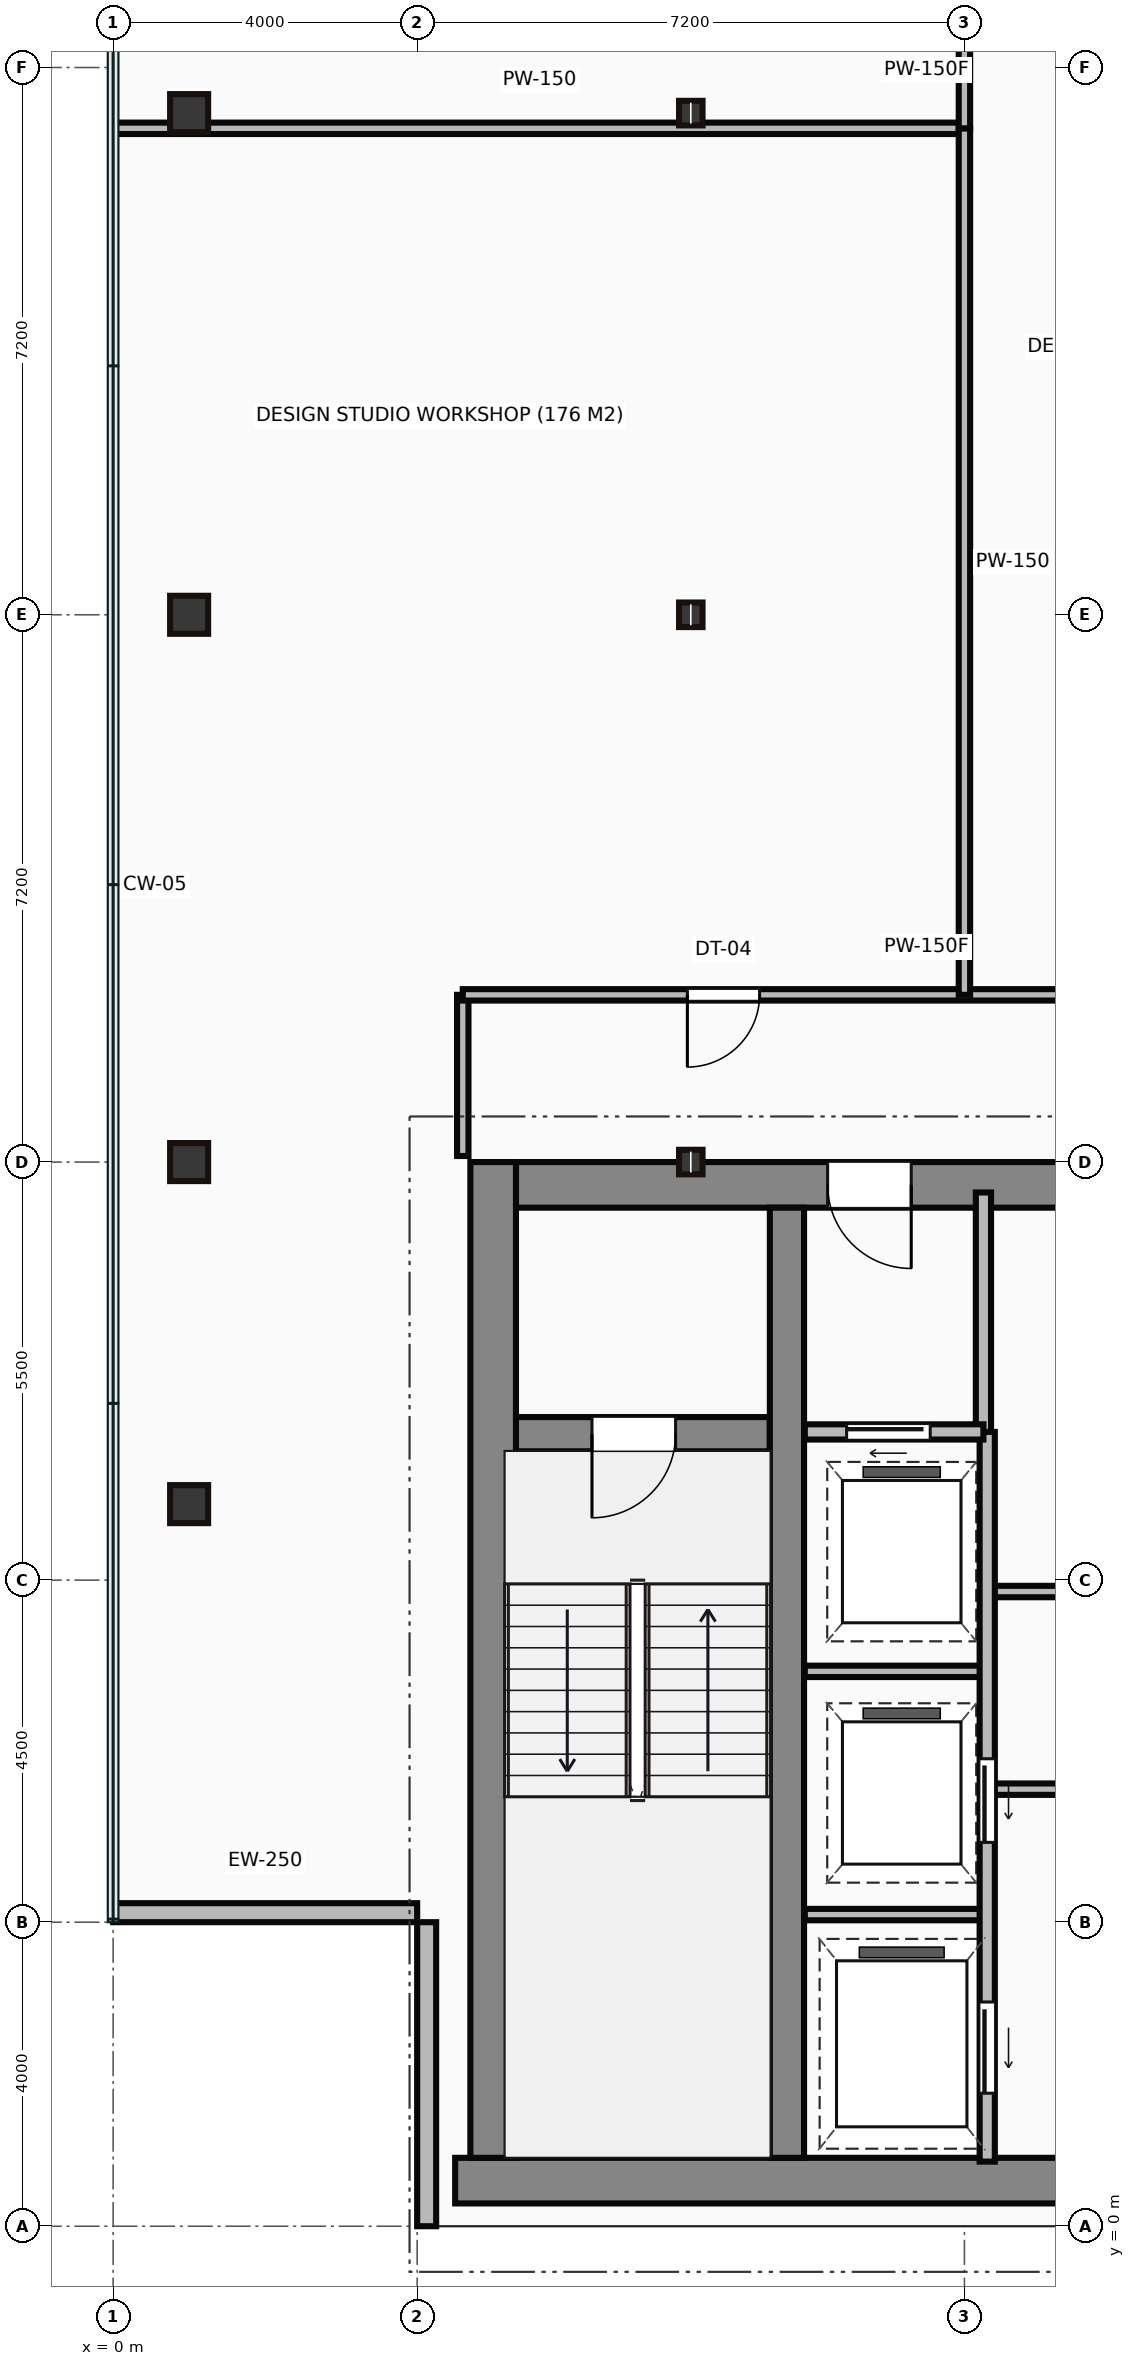
"""IFC4 building model, lengths in metres.
Left out: names, types, materials, properties, quantities, classifications, styles, units other than length and angle.
Written with IfcOpenShell. Run it as: python <this file> out.ifc"""

import sys

from ifc_helpers import new_model, si_unit, direction, frame, frame_2d, origin, origin_2d, place, context, subcontext, project, spatial, rectangle, hollow_rectangle, i_section, extrude, source, transform, mapped, element, fill, save


model = new_model("IFC4")
c1 = context("Model", 3, precision=1e-05, world=origin(), true_north=direction((0.0, 1.0)))
c2 = subcontext(c1, "Body", "Model", "MODEL_VIEW")
j1 = project(units=[si_unit("LENGTHUNIT", "METRE"), si_unit("PLANEANGLEUNIT", "RADIAN")], contexts=[c1])
p1 = place(None, origin())
s1 = spatial("IfcSite", under=j1, at=p1, CompositionType="ELEMENT")
p2 = place(p1, origin())
s2 = spatial("IfcBuilding", under=s1, at=p2, CompositionType="ELEMENT")
p3 = place(p2, frame((0.0, 0.0, 192.25)))
s3 = spatial("IfcBuildingStorey", under=s2, at=p3, CompositionType="ELEMENT", Elevation=192.25)
m1 = source(origin(), c2, "Body", "SweptSolid", [
    extrude(rectangle(XDim=29.5, YDim=0.6, at=frame_2d((14.75, 0.0))), origin(), (0.0, 0.0, 1.0), 3.65),
])
p4 = place(p3, frame((4.5, 0.6, 0.0), z_axis=(0.0, 0.0, 1.0), x_axis=(1.0, 0.0, 0.0)))
e1 = element("IfcWall", 1, at=p4, inside=s3, PredefinedType="SHEAR", context=c2, shape_type="MappedRepresentation", body=[
    mapped(m1, transform((0.0, 0.0, 0.0))),
])
m2 = source(origin(), c2, "Body", "SweptSolid", [
    extrude(rectangle(XDim=13.1, YDim=0.6, at=frame_2d((6.55, 0.0))), origin(), (0.0, 0.0, 1.0), 3.65),
])
p5 = place(p3, frame((5.0, 0.9, 0.0), z_axis=(0.0, 0.0, 1.0), x_axis=(0.0, 1.0, 0.0)))
e2 = element("IfcWall", 2, at=p5, inside=s3, PredefinedType="SHEAR", context=c2, shape_type="MappedRepresentation", body=[
    mapped(m2, transform((0.0, 0.0, 0.0))),
])
m3 = source(origin(), c2, "Body", "SweptSolid", [
    extrude(rectangle(XDim=9.1, YDim=0.6, at=frame_2d((4.55, 0.0))), origin(), (0.0, 0.0, 1.0), 3.65),
])
p6 = place(p3, frame((5.3, 13.7, 0.0), z_axis=(0.0, 0.0, 1.0), x_axis=(1.0, 0.0, 0.0)))
e3 = element("IfcWall", 3, at=p6, inside=s3, PredefinedType="SHEAR", context=c2, shape_type="MappedRepresentation", body=[
    mapped(m3, transform((0.0, 0.0, 0.0))),
])
p7 = place(p6, frame((4.1, 0.0, 0.0)))
e4 = element("IfcOpeningElement", 4, at=p7, cuts=e3, PredefinedType="OPENING", context=c2, shape_type="SweptSolid", body=[
    extrude(rectangle(XDim=1.1, YDim=2.15, at=frame_2d((0.55, 1.075))), frame((0.0, 0.31, 0.0), z_axis=(0.0, -1.0, 0.0), x_axis=(1.0, 0.0, 0.0)), (0.0, 0.0, 1.0), 0.62),
])
m4 = source(origin(), c2, "Body", "SweptSolid", [
    extrude(rectangle(XDim=12.5, YDim=0.45, at=frame_2d((6.25, 0.0))), origin(), (0.0, 0.0, 1.0), 3.65),
])
p8 = place(p3, frame((8.865, 0.9, 0.0), z_axis=(0.0, 0.0, 1.0), x_axis=(0.0, 1.0, 0.0)))
e5 = element("IfcWall", 5, at=p8, inside=s3, PredefinedType="SHEAR", context=c2, shape_type="MappedRepresentation", body=[
    mapped(m4, transform((0.0, 0.0, 0.0))),
])
m5 = source(origin(), c2, "Body", "SweptSolid", [
    extrude(rectangle(XDim=3.39, YDim=0.45, at=frame_2d((1.695, 0.0))), origin(), (0.0, 0.0, 1.0), 3.65),
])
p9 = place(p3, frame((5.25, 10.42, 0.0), z_axis=(0.0, 0.0, 1.0), x_axis=(1.0, 0.0, 0.0)))
e6 = element("IfcWall", 6, at=p9, inside=s3, PredefinedType="SHEAR", context=c2, shape_type="MappedRepresentation", body=[
    mapped(m5, transform((0.0, 0.0, 0.0))),
])
p10 = place(p9, frame((1.05, 0.0, 0.0)))
e7 = element("IfcOpeningElement", 7, at=p10, cuts=e6, PredefinedType="OPENING", context=c2, shape_type="SweptSolid", body=[
    extrude(rectangle(XDim=1.1, YDim=2.15, at=frame_2d((0.55, 1.075))), frame((0.0, 0.235, 0.0), z_axis=(0.0, -1.0, 0.0), x_axis=(1.0, 0.0, 0.0)), (0.0, 0.0, 1.0), 0.47),
])
m6 = source(origin(), c2, "Body", "SweptSolid", [
    extrude(hollow_rectangle(XDim=0.5, YDim=0.5, WallThickness=0.022, at=origin_2d()), origin(), (0.0, 0.0, 1.0), 3.65),
])
for number, where, z_axis, x_axis in (
    (8, (1.0, 9.5, 0.0), (0.0, 0.0, 1.0), (1.0, 0.0, 0.0)),
    (9, (1.0, 14.0, 0.0), (0.0, 0.0, 1.0), (1.0, 0.0, 0.0)),
    (10, (1.0, 21.2, 0.0), (0.0, 0.0, 1.0), (1.0, 0.0, 0.0)),
    (11, (1.0, 27.8, 0.0), (0.0, 0.0, 1.0), (1.0, 0.0, 0.0)),
):
    element("IfcColumn", number, at=place(p3, frame(where, z_axis=z_axis, x_axis=x_axis)), inside=s3, PredefinedType="COLUMN", context=c2, shape_type="MappedRepresentation", body=[
        mapped(m6, transform((0.0, 0.0, 0.0))),
    ])
m7 = source(origin(), c2, "Body", "SweptSolid", [
    extrude(i_section(OverallWidth=0.309, OverallDepth=0.323, WebThickness=0.014, FlangeThickness=0.023, at=origin_2d()), origin(), (0.0, 0.0, 1.0), 3.65),
])
for number, where, z_axis, x_axis in (
    (12, (7.6, 14.0, 0.0), (0.0, 0.0, 1.0), (1.0, 0.0, 0.0)),
    (13, (7.6, 21.2, 0.0), (0.0, 0.0, 1.0), (1.0, 0.0, 0.0)),
    (14, (7.6, 27.8, 0.0), (0.0, 0.0, 1.0), (1.0, 0.0, 0.0)),
):
    element("IfcColumn", number, at=place(p3, frame(where, z_axis=z_axis, x_axis=x_axis)), inside=s3, PredefinedType="COLUMN", context=c2, shape_type="MappedRepresentation", body=[
        mapped(m7, transform((0.0, 0.0, 0.0))),
    ])
m8 = source(origin(), c2, "Body", "SweptSolid", [
    extrude(rectangle(XDim=4.0, YDim=0.25, at=frame_2d((2.0, 0.0))), origin(), (0.0, 0.0, 1.0), 3.4),
])
for number, where, z_axis, x_axis in (
    (15, (0.0, 4.125, 0.0), (0.0, 0.0, 1.0), (1.0, 0.0, 0.0)),
    (16, (4.125, 4.0, 0.0), (0.0, 0.0, 1.0), (0.0, -1.0, 0.0)),
):
    element("IfcWall", number, at=place(p3, frame(where, z_axis=z_axis, x_axis=x_axis)), inside=s3, PredefinedType="STANDARD", context=c2, shape_type="MappedRepresentation", body=[
        mapped(m8, transform((0.0, 0.0, 0.0))),
    ])
m9 = source(origin(), c2, "Body", "SweptSolid", [
    extrude(rectangle(XDim=3.18, YDim=0.2, at=frame_2d((1.59, 0.0))), origin(), (0.0, 0.0, 1.0), 3.4),
])
p11 = place(p3, frame((11.45, 10.42, 0.0), z_axis=(0.0, 0.0, 1.0), x_axis=(0.0, 1.0, 0.0)))
e17 = element("IfcWall", 17, at=p11, inside=s3, PredefinedType="PARTITIONING", context=c2, shape_type="MappedRepresentation", body=[
    mapped(m9, transform((0.0, 0.0, 0.0))),
])
m10 = source(origin(), c2, "Body", "SweptSolid", [
    extrude(rectangle(XDim=2.35, YDim=0.2, at=frame_2d((1.175, 0.0))), origin(), (0.0, 0.0, 1.0), 3.4),
])
p12 = place(p3, frame((9.1, 10.45, 0.0), z_axis=(0.0, 0.0, 1.0), x_axis=(1.0, 0.0, 0.0)))
e18 = element("IfcWall", 18, at=p12, inside=s3, PredefinedType="PARTITIONING", context=c2, shape_type="MappedRepresentation", body=[
    mapped(m10, transform((0.0, 0.0, 0.0))),
])
p13 = place(p12, frame((0.55, 0.0, 0.0)))
e19 = element("IfcOpeningElement", 19, at=p13, cuts=e18, PredefinedType="OPENING", context=c2, shape_type="SweptSolid", body=[
    extrude(rectangle(XDim=1.1, YDim=2.15, at=frame_2d((0.55, 1.075))), frame((0.0, 0.11, 0.0), z_axis=(0.0, -1.0, 0.0), x_axis=(1.0, 0.0, 0.0)), (0.0, 0.0, 1.0), 0.22),
])
m11 = source(origin(), c2, "Body", "SweptSolid", [
    extrude(rectangle(XDim=9.6, YDim=0.2, at=frame_2d((4.8, 0.0))), origin(), (0.0, 0.0, 1.0), 3.4),
])
p14 = place(p3, frame((11.5, 0.85, 0.0), z_axis=(0.0, 0.0, 1.0), x_axis=(0.0, 1.0, 0.0)))
e20 = element("IfcWall", 20, at=p14, inside=s3, PredefinedType="PARTITIONING", context=c2, shape_type="MappedRepresentation", body=[
    mapped(m11, transform((0.0, 0.0, 0.0))),
])
p15 = place(p14, frame((4.2, 0.0, 0.0)))
e21 = element("IfcOpeningElement", 21, at=p15, cuts=e20, PredefinedType="OPENING", context=c2, shape_type="SweptSolid", body=[
    extrude(rectangle(XDim=1.1, YDim=2.15, at=frame_2d((0.55, 1.075))), frame((0.0, 0.11, 0.0), z_axis=(0.0, -1.0, 0.0), x_axis=(1.0, 0.0, 0.0)), (0.0, 0.0, 1.0), 0.22),
])
p16 = place(p14, frame((0.9, 0.0, 0.0)))
e22 = element("IfcOpeningElement", 22, at=p16, cuts=e20, PredefinedType="OPENING", context=c2, shape_type="SweptSolid", body=[
    extrude(rectangle(XDim=1.2, YDim=2.15, at=frame_2d((0.6, 1.075))), frame((0.0, 0.11, 0.0), z_axis=(0.0, -1.0, 0.0), x_axis=(1.0, 0.0, 0.0)), (0.0, 0.0, 1.0), 0.22),
])
m12 = source(origin(), c2, "Body", "SweptSolid", [
    extrude(rectangle(XDim=2.4, YDim=0.15, at=frame_2d((1.2, 0.0))), origin(), (0.0, 0.0, 1.0), 3.4),
])
for number, where, z_axis, x_axis in (
    (23, (9.1, 4.1, 0.0), (0.0, 0.0, 1.0), (1.0, 0.0, 0.0)),
    (24, (9.1, 7.3, 0.0), (0.0, 0.0, 1.0), (1.0, 0.0, 0.0)),
):
    element("IfcWall", number, at=place(p3, frame(where, z_axis=z_axis, x_axis=x_axis)), inside=s3, PredefinedType="PARTITIONING", context=c2, shape_type="MappedRepresentation", body=[
        mapped(m12, transform((0.0, 0.0, 0.0))),
    ])
m13 = source(origin(), c2, "Body", "SweptSolid", [
    extrude(rectangle(XDim=11.85, YDim=0.15, at=frame_2d((5.925, 0.0))), origin(), (0.0, 0.0, 1.0), 3.4),
])
p17 = place(p3, frame((11.55, 5.75, 0.0), z_axis=(0.0, 0.0, 1.0), x_axis=(1.0, 0.0, 0.0)))
e25 = element("IfcWall", 25, at=p17, inside=s3, PredefinedType="PARTITIONING", context=c2, shape_type="MappedRepresentation", body=[
    mapped(m13, transform((0.0, 0.0, 0.0))),
])
p18 = place(p3, frame((11.55, 8.35, 0.0), z_axis=(0.0, 0.0, 1.0), x_axis=(1.0, 0.0, 0.0)))
e26 = element("IfcWall", 26, at=p18, inside=s3, PredefinedType="PARTITIONING", context=c2, shape_type="MappedRepresentation", body=[
    mapped(m13, transform((0.0, 0.0, 0.0))),
])
p19 = place(p18, frame((1.1, 0.0, 0.0)))
e27 = element("IfcOpeningElement", 27, at=p19, cuts=e26, PredefinedType="OPENING", context=c2, shape_type="SweptSolid", body=[
    extrude(rectangle(XDim=0.95, YDim=2.15, at=frame_2d((0.475, 1.075))), frame((0.0, 0.085, 0.0), z_axis=(0.0, -1.0, 0.0), x_axis=(1.0, 0.0, 0.0)), (0.0, 0.0, 1.0), 0.17),
])
p20 = place(p18, frame((9.4, 0.0, 0.0)))
e28 = element("IfcOpeningElement", 28, at=p20, cuts=e26, PredefinedType="OPENING", context=c2, shape_type="SweptSolid", body=[
    extrude(rectangle(XDim=0.95, YDim=2.15, at=frame_2d((0.475, 1.075))), frame((0.0, 0.085, 0.0), z_axis=(0.0, -1.0, 0.0), x_axis=(1.0, 0.0, 0.0)), (0.0, 0.0, 1.0), 0.17),
])
m14 = source(origin(), c2, "Body", "SweptSolid", [
    extrude(rectangle(XDim=2.12, YDim=0.15, at=frame_2d((1.06, 0.0))), origin(), (0.0, 0.0, 1.0), 3.4),
])
p21 = place(p3, frame((4.6, 14.08, 0.0), z_axis=(0.0, 0.0, 1.0), x_axis=(0.0, 1.0, 0.0)))
e29 = element("IfcWall", 29, at=p21, inside=s3, PredefinedType="PARTITIONING", context=c2, shape_type="MappedRepresentation", body=[
    mapped(m14, transform((0.0, 0.0, 0.0))),
])
m15 = source(origin(), c2, "Body", "SweptSolid", [
    extrude(rectangle(XDim=12.2, YDim=0.15, at=frame_2d((6.1, 0.0))), origin(), (0.0, 0.0, 1.0), 3.4),
])
p22 = place(p3, frame((4.6, 16.2, 0.0), z_axis=(0.0, 0.0, 1.0), x_axis=(1.0, 0.0, 0.0)))
e30 = element("IfcWall", 30, at=p22, inside=s3, PredefinedType="PARTITIONING", context=c2, shape_type="MappedRepresentation", body=[
    mapped(m15, transform((0.0, 0.0, 0.0))),
])
p23 = place(p22, frame((2.955, 0.0, 0.0)))
e31 = element("IfcOpeningElement", 31, at=p23, cuts=e30, PredefinedType="OPENING", context=c2, shape_type="SweptSolid", body=[
    extrude(rectangle(XDim=0.95, YDim=2.15, at=frame_2d((0.475, 1.075))), frame((0.0, 0.085, 0.0), z_axis=(0.0, -1.0, 0.0), x_axis=(1.0, 0.0, 0.0)), (0.0, 0.0, 1.0), 0.17),
])
m16 = source(origin(), c2, "Body", "SweptSolid", [
    extrude(rectangle(XDim=11.18, YDim=0.15, at=frame_2d((5.59, 0.0))), origin(), (0.0, 0.0, 1.0), 3.4),
])
p24 = place(p3, frame((0.02, 27.6, 0.0), z_axis=(0.0, 0.0, 1.0), x_axis=(1.0, 0.0, 0.0)))
e32 = element("IfcWall", 32, at=p24, inside=s3, PredefinedType="PARTITIONING", context=c2, shape_type="MappedRepresentation", body=[
    mapped(m16, transform((0.0, 0.0, 0.0))),
])
m17 = source(origin(), c2, "Body", "SweptSolid", [
    extrude(rectangle(XDim=11.4, YDim=0.15, at=frame_2d((5.7, 0.0))), origin(), (0.0, 0.0, 1.0), 3.4),
])
p25 = place(p3, frame((11.2, 27.6, 0.0), z_axis=(0.0, 0.0, 1.0), x_axis=(0.0, -1.0, 0.0)))
e33 = element("IfcWall", 33, at=p25, inside=s3, PredefinedType="PARTITIONING", context=c2, shape_type="MappedRepresentation", body=[
    mapped(m17, transform((0.0, 0.0, 0.0))),
])
m18 = source(origin(), c2, "Body", "SweptSolid", [
    extrude(rectangle(XDim=1.4, YDim=0.15, at=frame_2d((0.7, 0.0))), origin(), (0.0, 0.0, 1.0), 3.4),
])
p26 = place(p3, frame((11.2, 29.0, 0.0), z_axis=(0.0, 0.0, 1.0), x_axis=(0.0, -1.0, 0.0)))
e34 = element("IfcWall", 34, at=p26, inside=s3, PredefinedType="PARTITIONING", context=c2, shape_type="MappedRepresentation", body=[
    mapped(m18, transform((0.0, 0.0, 0.0))),
])
m19 = source(origin(), c2, "Body", "SweptSolid", [
    extrude(rectangle(XDim=1.1, YDim=2.15, at=frame_2d((0.55, 1.075))), frame((0.0, 0.025, 0.0), z_axis=(0.0, -1.0, 0.0), x_axis=(1.0, 0.0, 0.0)), (0.0, 0.0, 1.0), 0.05),
])
p27 = place(p10, frame((1.1, 0.0, 0.0), z_axis=(0.0, 0.0, 1.0), x_axis=(-1.0, 0.0, 0.0)))
e35 = element("IfcDoor", 35, at=p27, inside=s3, OperationType="SINGLE_SWING_LEFT", PredefinedType="DOOR", context=c2, shape_type="MappedRepresentation", body=[
    mapped(m19, transform((0.0, 0.0, 0.0))),
])
fill(e7, e35)
p28 = place(p7, origin())
e36 = element("IfcDoor", 36, at=p28, inside=s3, OperationType="SINGLE_SWING_RIGHT", PredefinedType="DOOR", context=c2, shape_type="MappedRepresentation", body=[
    mapped(m19, transform((0.0, 0.0, 0.0))),
])
fill(e4, e36)
p29 = place(p13, origin())
e37 = element("IfcDoor", 37, at=p29, inside=s3, OperationType="SLIDING_TO_LEFT", PredefinedType="DOOR", context=c2, shape_type="MappedRepresentation", body=[
    mapped(m19, transform((0.0, 0.0, 0.0))),
])
fill(e19, e37)
p30 = place(p15, frame((1.1, 0.0, 0.0), z_axis=(0.0, 0.0, 1.0), x_axis=(-1.0, 0.0, 0.0)))
e38 = element("IfcDoor", 38, at=p30, inside=s3, OperationType="SLIDING_TO_LEFT", PredefinedType="DOOR", context=c2, shape_type="MappedRepresentation", body=[
    mapped(m19, transform((0.0, 0.0, 0.0))),
])
fill(e21, e38)
m20 = source(origin(), c2, "Body", "SweptSolid", [
    extrude(rectangle(XDim=1.2, YDim=2.15, at=frame_2d((0.6, 1.075))), frame((0.0, 0.025, 0.0), z_axis=(0.0, -1.0, 0.0), x_axis=(1.0, 0.0, 0.0)), (0.0, 0.0, 1.0), 0.05),
])
p31 = place(p16, frame((1.2, 0.0, 0.0), z_axis=(0.0, 0.0, 1.0), x_axis=(-1.0, 0.0, 0.0)))
e39 = element("IfcDoor", 39, at=p31, inside=s3, OperationType="SLIDING_TO_LEFT", PredefinedType="DOOR", context=c2, shape_type="MappedRepresentation", body=[
    mapped(m20, transform((0.0, 0.0, 0.0))),
])
fill(e22, e39)
m21 = source(origin(), c2, "Body", "SweptSolid", [
    extrude(rectangle(XDim=0.95, YDim=2.15, at=frame_2d((0.475, 1.075))), frame((0.0, 0.025, 0.0), z_axis=(0.0, -1.0, 0.0), x_axis=(1.0, 0.0, 0.0)), (0.0, 0.0, 1.0), 0.05),
])
p32 = place(p23, origin())
e40 = element("IfcDoor", 40, at=p32, inside=s3, OperationType="SINGLE_SWING_LEFT", PredefinedType="DOOR", context=c2, shape_type="MappedRepresentation", body=[
    mapped(m21, transform((0.0, 0.0, 0.0))),
])
fill(e31, e40)
save(model, sys.argv[1])
